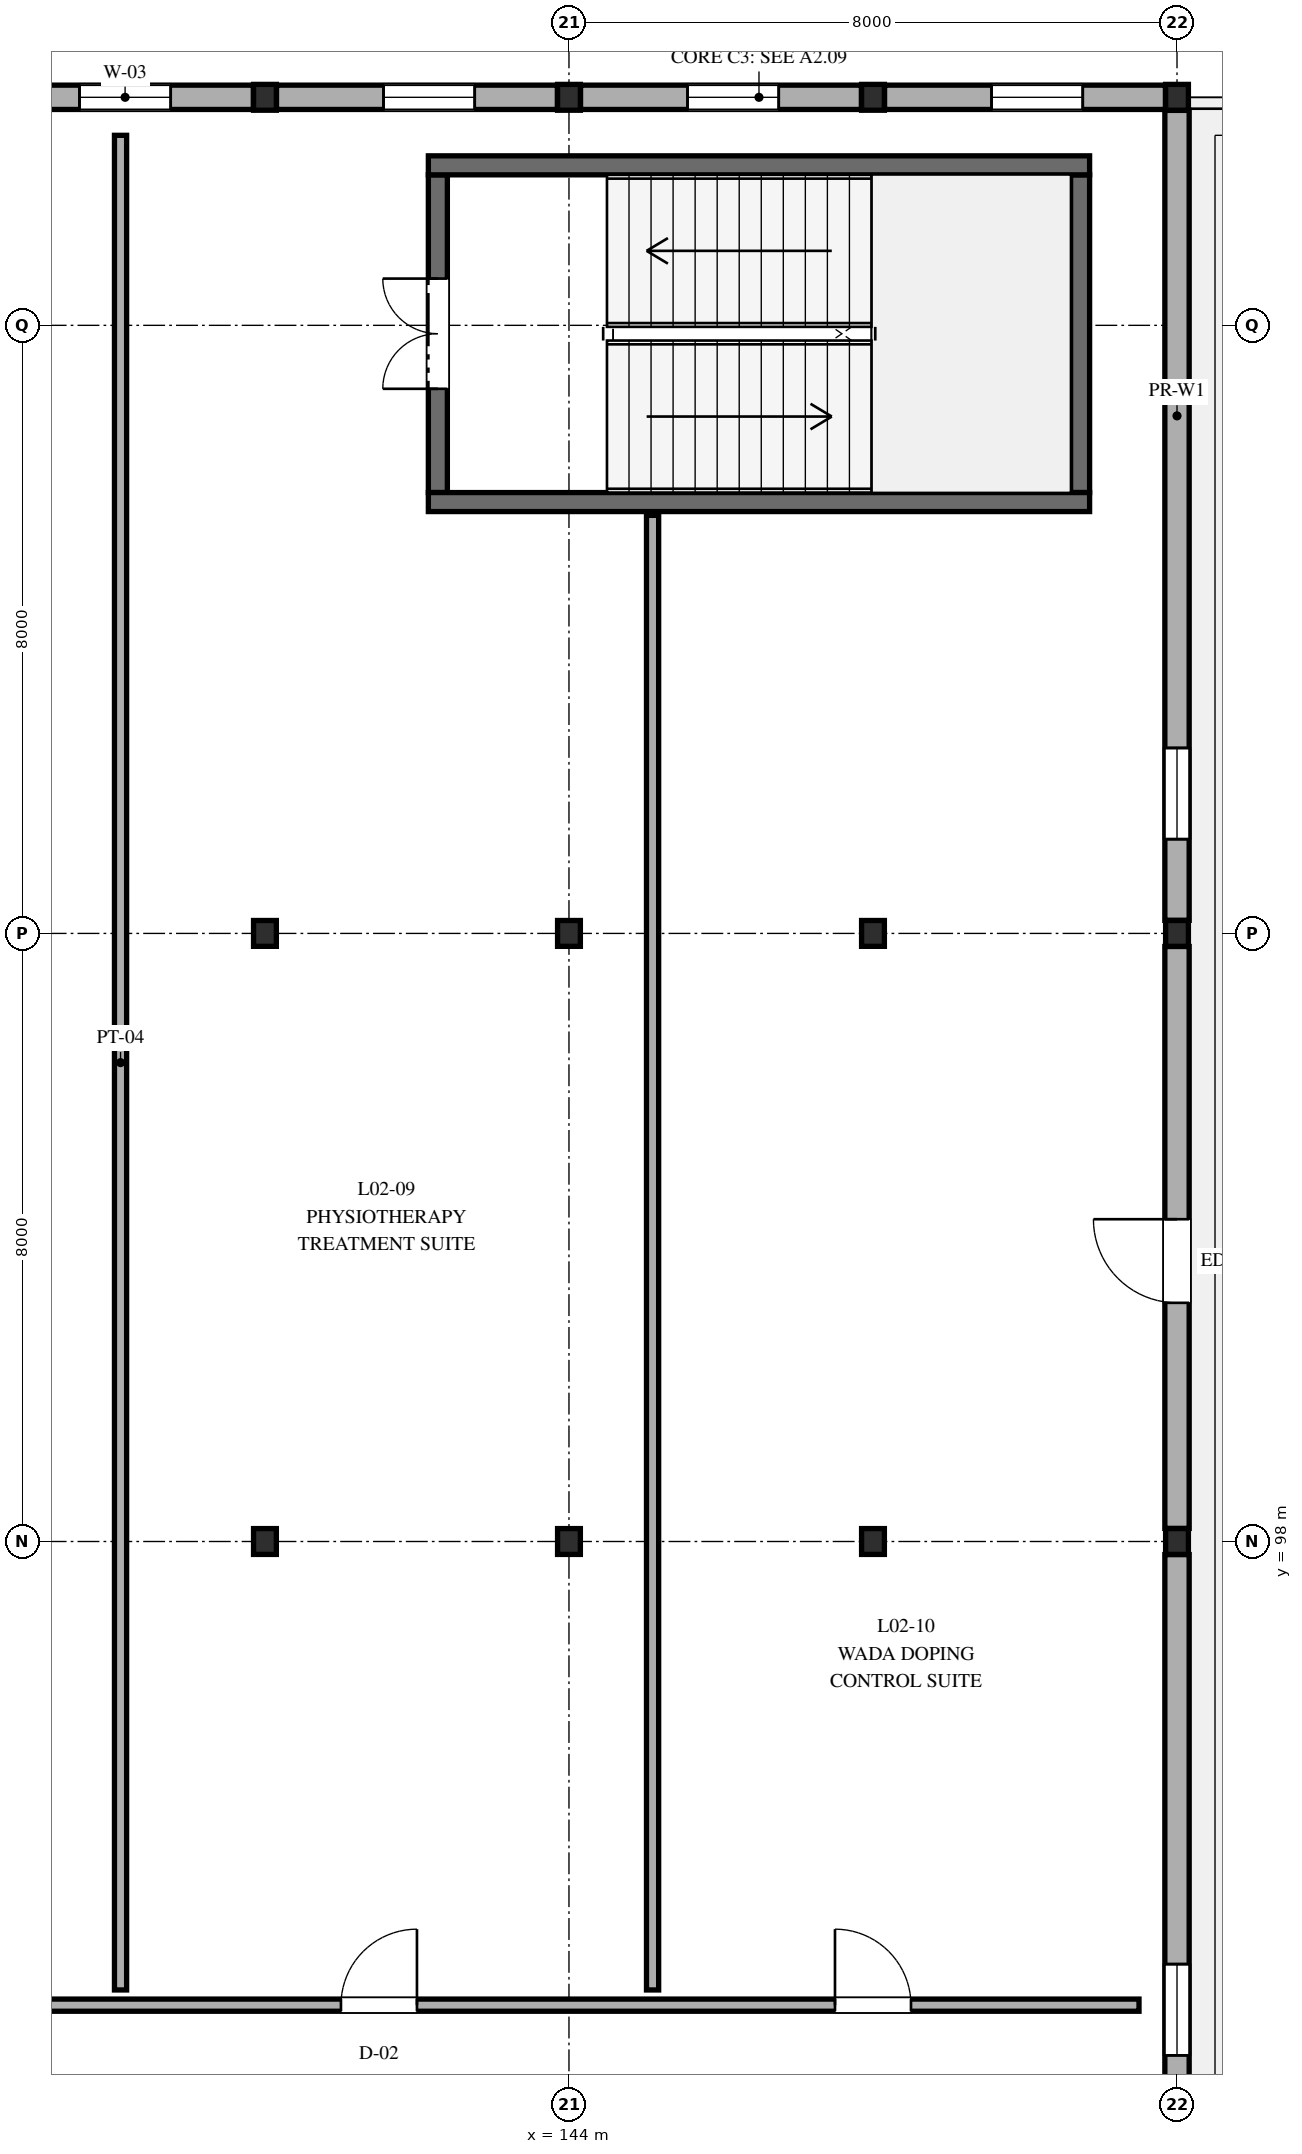
"""IFC4 building model, lengths in metres.
Left out: names, types, materials, properties, quantities, classifications, styles, units other than length and angle.
Written with IfcOpenShell. Run it as: python <this file> out.ifc"""

import sys

from ifc_helpers import new_model, si_unit, direction, frame, frame_2d, origin, origin_2d, place, context, subcontext, project, spatial, rectangle, i_section, extrude, element, fill, save


model = new_model("IFC4")
c1 = context("Model", 3, precision=1e-05, world=origin(), true_north=direction((0.0, 1.0)))
c2 = subcontext(c1, "Body", "Model", "MODEL_VIEW")
j1 = project(units=[si_unit("LENGTHUNIT", "METRE"), si_unit("PLANEANGLEUNIT", "RADIAN")], contexts=[c1])
p1 = place(None, origin())
s1 = spatial("IfcSite", under=j1, at=p1, CompositionType="ELEMENT")
p2 = place(p1, origin())
s2 = spatial("IfcBuilding", under=s1, at=p2, CompositionType="ELEMENT")
p3 = place(p2, frame((0.0, 0.0, 9.6)))
s3 = spatial("IfcBuildingStorey", under=s2, at=p3, CompositionType="ELEMENT", Elevation=9.6)
for number, where, z_axis, x_axis in (
    (1, (140.0, 98.0, 0.0), (0.0, 0.0, 1.0), (1.0, 0.0, 0.0)),
    (2, (140.0, 106.0, 0.0), (0.0, 0.0, 1.0), (1.0, 0.0, 0.0)),
    (3, (140.0, 117.0, 0.0), (0.0, 0.0, 1.0), (1.0, 0.0, 0.0)),
    (4, (144.0, 98.0, 0.0), (0.0, 0.0, 1.0), (1.0, 0.0, 0.0)),
    (5, (144.0, 106.0, 0.0), (0.0, 0.0, 1.0), (1.0, 0.0, 0.0)),
    (6, (144.0, 117.0, 0.0), (0.0, 0.0, 1.0), (1.0, 0.0, 0.0)),
    (7, (148.0, 98.0, 0.0), (0.0, 0.0, 1.0), (1.0, 0.0, 0.0)),
    (8, (148.0, 106.0, 0.0), (0.0, 0.0, 1.0), (1.0, 0.0, 0.0)),
    (9, (148.0, 117.0, 0.0), (0.0, 0.0, 1.0), (1.0, 0.0, 0.0)),
    (10, (152.0, 98.0, 0.0), (0.0, 0.0, 1.0), (1.0, 0.0, 0.0)),
    (11, (152.0, 106.0, 0.0), (0.0, 0.0, 1.0), (1.0, 0.0, 0.0)),
    (12, (152.0, 117.0, 0.0), (0.0, 0.0, 1.0), (1.0, 0.0, 0.0)),
):
    element("IfcColumn", number, at=place(p3, frame(where, z_axis=z_axis, x_axis=x_axis)), inside=s3, PredefinedType="COLUMN", context=c2, shape_type="SweptSolid", body=[
        extrude(i_section(OverallWidth=0.3, OverallDepth=0.34, WebThickness=0.012, FlangeThickness=0.021, FilletRadius=0.027, at=origin_2d()), origin(), (0.0, 0.0, 1.0), 4.4),
    ])
p4 = place(p3, frame((139.848, 117.0, 0.0), z_axis=(0.0, 0.0, 1.0), x_axis=(-1.0, 0.0, 0.0)))
e13 = element("IfcWall", 13, at=p4, inside=s3, PredefinedType="STANDARD", context=c2, shape_type="SweptSolid", body=[
    extrude(rectangle(XDim=3.696, YDim=0.32, at=frame_2d((1.848, 0.0))), origin(), (0.0, 0.0, 1.0), 3.775),
])
p5 = place(p4, frame((1.088, 0.0, 0.95)))
e14 = element("IfcOpeningElement", 14, at=p5, cuts=e13, PredefinedType="OPENING", context=c2, shape_type="SweptSolid", body=[
    extrude(rectangle(XDim=1.2, YDim=1.5, at=frame_2d((0.6, 0.75))), frame((0.0, 0.17, 0.0), z_axis=(0.0, -1.0, 0.0), x_axis=(1.0, 0.0, 0.0)), (0.0, 0.0, 1.0), 0.34),
])
p6 = place(p3, frame((143.848, 117.0, 0.0), z_axis=(0.0, 0.0, 1.0), x_axis=(-1.0, 0.0, 0.0)))
e15 = element("IfcWall", 15, at=p6, inside=s3, PredefinedType="STANDARD", context=c2, shape_type="SweptSolid", body=[
    extrude(rectangle(XDim=3.696, YDim=0.32, at=frame_2d((1.848, 0.0))), origin(), (0.0, 0.0, 1.0), 3.775),
])
p7 = place(p6, frame((1.088, 0.0, 0.95)))
e16 = element("IfcOpeningElement", 16, at=p7, cuts=e15, PredefinedType="OPENING", context=c2, shape_type="SweptSolid", body=[
    extrude(rectangle(XDim=1.2, YDim=1.5, at=frame_2d((0.6, 0.75))), frame((0.0, 0.17, 0.0), z_axis=(0.0, -1.0, 0.0), x_axis=(1.0, 0.0, 0.0)), (0.0, 0.0, 1.0), 0.34),
])
p8 = place(p3, frame((147.848, 117.0, 0.0), z_axis=(0.0, 0.0, 1.0), x_axis=(-1.0, 0.0, 0.0)))
e17 = element("IfcWall", 17, at=p8, inside=s3, PredefinedType="STANDARD", context=c2, shape_type="SweptSolid", body=[
    extrude(rectangle(XDim=3.696, YDim=0.32, at=frame_2d((1.848, 0.0))), origin(), (0.0, 0.0, 1.0), 3.775),
])
p9 = place(p8, frame((1.088, 0.0, 0.95)))
e18 = element("IfcOpeningElement", 18, at=p9, cuts=e17, PredefinedType="OPENING", context=c2, shape_type="SweptSolid", body=[
    extrude(rectangle(XDim=1.2, YDim=1.5, at=frame_2d((0.6, 0.75))), frame((0.0, 0.17, 0.0), z_axis=(0.0, -1.0, 0.0), x_axis=(1.0, 0.0, 0.0)), (0.0, 0.0, 1.0), 0.34),
])
p10 = place(p3, frame((151.848, 117.0, 0.0), z_axis=(0.0, 0.0, 1.0), x_axis=(-1.0, 0.0, 0.0)))
e19 = element("IfcWall", 19, at=p10, inside=s3, PredefinedType="STANDARD", context=c2, shape_type="SweptSolid", body=[
    extrude(rectangle(XDim=3.696, YDim=0.32, at=frame_2d((1.848, 0.0))), origin(), (0.0, 0.0, 1.0), 3.775),
])
p11 = place(p10, frame((1.088, 0.0, 0.95)))
e20 = element("IfcOpeningElement", 20, at=p11, cuts=e19, PredefinedType="OPENING", context=c2, shape_type="SweptSolid", body=[
    extrude(rectangle(XDim=1.2, YDim=1.5, at=frame_2d((0.6, 0.75))), frame((0.0, 0.17, 0.0), z_axis=(0.0, -1.0, 0.0), x_axis=(1.0, 0.0, 0.0)), (0.0, 0.0, 1.0), 0.34),
])
p12 = place(p3, frame((152.0, 90.172, 0.0), z_axis=(0.0, 0.0, 1.0), x_axis=(0.0, 1.0, 0.0)))
e21 = element("IfcWall", 21, at=p12, inside=s3, PredefinedType="STANDARD", context=c2, shape_type="SweptSolid", body=[
    extrude(rectangle(XDim=7.656, YDim=0.32, at=frame_2d((3.828, 0.0))), origin(), (0.0, 0.0, 1.0), 3.825),
])
p13 = place(p12, frame((1.068, 0.0, 0.95)))
e22 = element("IfcOpeningElement", 22, at=p13, cuts=e21, PredefinedType="OPENING", context=c2, shape_type="SweptSolid", body=[
    extrude(rectangle(XDim=1.2, YDim=1.5, at=frame_2d((0.6, 0.75))), frame((0.0, 0.17, 0.0), z_axis=(0.0, -1.0, 0.0), x_axis=(1.0, 0.0, 0.0)), (0.0, 0.0, 1.0), 0.34),
])
p14 = place(p3, frame((152.0, 98.172, 0.0), z_axis=(0.0, 0.0, 1.0), x_axis=(0.0, 1.0, 0.0)))
e23 = element("IfcWall", 23, at=p14, inside=s3, PredefinedType="STANDARD", context=c2, shape_type="SweptSolid", body=[
    extrude(rectangle(XDim=7.656, YDim=0.32, at=frame_2d((3.828, 0.0))), origin(), (0.0, 0.0, 1.0), 3.825),
])
p15 = place(p14, frame((2.968, 0.0, 0.0)))
e24 = element("IfcOpeningElement", 24, at=p15, cuts=e23, PredefinedType="OPENING", context=c2, shape_type="SweptSolid", body=[
    extrude(rectangle(XDim=1.1, YDim=2.2, at=frame_2d((0.55, 1.1))), frame((0.0, 0.17, 0.0), z_axis=(0.0, -1.0, 0.0), x_axis=(1.0, 0.0, 0.0)), (0.0, 0.0, 1.0), 0.34),
])
p16 = place(p3, frame((152.0, 106.172, 0.0), z_axis=(0.0, 0.0, 1.0), x_axis=(0.0, 1.0, 0.0)))
e25 = element("IfcWall", 25, at=p16, inside=s3, PredefinedType="STANDARD", context=c2, shape_type="SweptSolid", body=[
    extrude(rectangle(XDim=10.656, YDim=0.32, at=frame_2d((5.328, 0.0))), origin(), (0.0, 0.0, 1.0), 3.825),
])
p17 = place(p16, frame((1.068, 0.0, 0.95)))
e26 = element("IfcOpeningElement", 26, at=p17, cuts=e25, PredefinedType="OPENING", context=c2, shape_type="SweptSolid", body=[
    extrude(rectangle(XDim=1.2, YDim=1.5, at=frame_2d((0.6, 0.75))), frame((0.0, 0.17, 0.0), z_axis=(0.0, -1.0, 0.0), x_axis=(1.0, 0.0, 0.0)), (0.0, 0.0, 1.0), 0.34),
])
p18 = place(p3, frame((142.275, 111.8, 0.0), z_axis=(0.0, 0.0, 1.0), x_axis=(0.0, 1.0, 0.0)))
e27 = element("IfcWall", 27, at=p18, inside=s3, PredefinedType="SHEAR", context=c2, shape_type="SweptSolid", body=[
    extrude(rectangle(XDim=4.18, YDim=0.25, at=frame_2d((2.09, 0.0))), origin(), (0.0, 0.0, 1.0), 4.4),
])
p19 = place(p18, frame((1.365, 0.0, 0.0)))
e28 = element("IfcOpeningElement", 28, at=p19, cuts=e27, PredefinedType="OPENING", context=c2, shape_type="SweptSolid", body=[
    extrude(rectangle(XDim=1.45, YDim=2.2, at=frame_2d((0.725, 1.1))), frame((0.0, 0.135, 0.0), z_axis=(0.0, -1.0, 0.0), x_axis=(1.0, 0.0, 0.0)), (0.0, 0.0, 1.0), 0.27),
])
p20 = place(p3, frame((150.725, 115.98, 0.0), z_axis=(0.0, 0.0, 1.0), x_axis=(0.0, -1.0, 0.0)))
e29 = element("IfcWall", 29, at=p20, inside=s3, PredefinedType="SHEAR", context=c2, shape_type="SweptSolid", body=[
    extrude(rectangle(XDim=4.18, YDim=0.25, at=frame_2d((2.09, 0.0))), origin(), (0.0, 0.0, 1.0), 4.4),
])
for number, where, z_axis, x_axis in (
    (30, (142.15, 111.675, 0.0), (0.0, 0.0, 1.0), (1.0, 0.0, 0.0)),
    (31, (150.85, 116.105, 0.0), (0.0, 0.0, 1.0), (-1.0, 0.0, 0.0)),
):
    element("IfcWall", number, at=place(p3, frame(where, z_axis=z_axis, x_axis=x_axis)), inside=s3, PredefinedType="SHEAR", context=c2, shape_type="SweptSolid", body=[
        extrude(rectangle(XDim=8.7, YDim=0.25, at=frame_2d((4.35, 0.0))), origin(), (0.0, 0.0, 1.0), 4.4),
    ])
p21 = place(p3, frame((104.5, 91.9, 0.0), z_axis=(0.0, 0.0, 1.0), x_axis=(1.0, 0.0, 0.0)))
e32 = element("IfcWall", 32, at=p21, inside=s3, PredefinedType="PARTITIONING", context=c2, shape_type="SweptSolid", body=[
    extrude(rectangle(XDim=47.0, YDim=0.16, at=frame_2d((23.5, 0.0))), origin(), (0.0, 0.0, 1.0), 3.7),
])
p22 = place(p21, frame((2.5, 0.0, 0.0)))
e33 = element("IfcOpeningElement", 33, at=p22, cuts=e32, PredefinedType="OPENING", context=c2, shape_type="SweptSolid", body=[
    extrude(rectangle(XDim=1.1, YDim=2.2, at=frame_2d((0.55, 1.1))), frame((0.0, 0.09, 0.0), z_axis=(0.0, -1.0, 0.0), x_axis=(1.0, 0.0, 0.0)), (0.0, 0.0, 1.0), 0.18),
])
p23 = place(p21, frame((9.5, 0.0, 0.0)))
e34 = element("IfcOpeningElement", 34, at=p23, cuts=e32, PredefinedType="OPENING", context=c2, shape_type="SweptSolid", body=[
    extrude(rectangle(XDim=1.05, YDim=2.15, at=frame_2d((0.525, 1.075))), frame((0.0, 0.09, 0.0), z_axis=(0.0, -1.0, 0.0), x_axis=(1.0, 0.0, 0.0)), (0.0, 0.0, 1.0), 0.18),
])
p24 = place(p21, frame((12.8, 0.0, 0.0)))
e35 = element("IfcOpeningElement", 35, at=p24, cuts=e32, PredefinedType="OPENING", context=c2, shape_type="SweptSolid", body=[
    extrude(rectangle(XDim=1.6, YDim=2.2, at=frame_2d((0.8, 1.1))), frame((0.0, 0.09, 0.0), z_axis=(0.0, -1.0, 0.0), x_axis=(1.0, 0.0, 0.0)), (0.0, 0.0, 1.0), 0.18),
])
p25 = place(p21, frame((24.0, 0.0, 0.0)))
e36 = element("IfcOpeningElement", 36, at=p25, cuts=e32, PredefinedType="OPENING", context=c2, shape_type="SweptSolid", body=[
    extrude(rectangle(XDim=1.0, YDim=2.15, at=frame_2d((0.5, 1.075))), frame((0.0, 0.09, 0.0), z_axis=(0.0, -1.0, 0.0), x_axis=(1.0, 0.0, 0.0)), (0.0, 0.0, 1.0), 0.18),
])
p26 = place(p21, frame((36.5, 0.0, 0.0)))
e37 = element("IfcOpeningElement", 37, at=p26, cuts=e32, PredefinedType="OPENING", context=c2, shape_type="SweptSolid", body=[
    extrude(rectangle(XDim=1.0, YDim=2.15, at=frame_2d((0.5, 1.075))), frame((0.0, 0.09, 0.0), z_axis=(0.0, -1.0, 0.0), x_axis=(1.0, 0.0, 0.0)), (0.0, 0.0, 1.0), 0.18),
])
p27 = place(p21, frame((43.0, 0.0, 0.0)))
e38 = element("IfcOpeningElement", 38, at=p27, cuts=e32, PredefinedType="OPENING", context=c2, shape_type="SweptSolid", body=[
    extrude(rectangle(XDim=1.0, YDim=2.15, at=frame_2d((0.5, 1.075))), frame((0.0, 0.09, 0.0), z_axis=(0.0, -1.0, 0.0), x_axis=(1.0, 0.0, 0.0)), (0.0, 0.0, 1.0), 0.18),
])
p28 = place(p21, frame((28.5, 0.0, 1.1)))
e39 = element("IfcOpeningElement", 39, at=p28, cuts=e32, PredefinedType="OPENING", context=c2, shape_type="SweptSolid", body=[
    extrude(rectangle(XDim=1.6, YDim=1.35, at=frame_2d((0.8, 0.675))), frame((0.0, 0.09, 0.0), z_axis=(0.0, -1.0, 0.0), x_axis=(1.0, 0.0, 0.0)), (0.0, 0.0, 1.0), 0.18),
])
p29 = place(p3, frame((138.1, 92.1, 0.0), z_axis=(0.0, 0.0, 1.0), x_axis=(0.0, 1.0, 0.0)))
e40 = element("IfcWall", 40, at=p29, inside=s3, PredefinedType="PARTITIONING", context=c2, shape_type="SweptSolid", body=[
    extrude(rectangle(XDim=24.4, YDim=0.16, at=frame_2d((12.2, 0.0))), origin(), (0.0, 0.0, 1.0), 3.7),
])
p30 = place(p3, frame((145.1, 92.1, 0.0), z_axis=(0.0, 0.0, 1.0), x_axis=(0.0, 1.0, 0.0)))
e41 = element("IfcWall", 41, at=p30, inside=s3, PredefinedType="PARTITIONING", context=c2, shape_type="SweptSolid", body=[
    extrude(rectangle(XDim=19.4, YDim=0.16, at=frame_2d((9.7, 0.0))), origin(), (0.0, 0.0, 1.0), 3.7),
])
p31 = place(p5, origin())
e42 = element("IfcWindow", 42, at=p31, inside=s3, PartitioningType="SINGLE_PANEL", PredefinedType="WINDOW", context=c2, shape_type="SweptSolid", body=[
    extrude(rectangle(XDim=1.2, YDim=1.5, at=frame_2d((0.6, 0.75))), frame((0.0, 0.03, 0.0), z_axis=(0.0, -1.0, 0.0), x_axis=(1.0, 0.0, 0.0)), (0.0, 0.0, 1.0), 0.06),
])
fill(e14, e42)
p32 = place(p7, origin())
e43 = element("IfcWindow", 43, at=p32, inside=s3, PartitioningType="SINGLE_PANEL", PredefinedType="WINDOW", context=c2, shape_type="SweptSolid", body=[
    extrude(rectangle(XDim=1.2, YDim=1.5, at=frame_2d((0.6, 0.75))), frame((0.0, 0.03, 0.0), z_axis=(0.0, -1.0, 0.0), x_axis=(1.0, 0.0, 0.0)), (0.0, 0.0, 1.0), 0.06),
])
fill(e16, e43)
p33 = place(p9, origin())
e44 = element("IfcWindow", 44, at=p33, inside=s3, PartitioningType="SINGLE_PANEL", PredefinedType="WINDOW", context=c2, shape_type="SweptSolid", body=[
    extrude(rectangle(XDim=1.2, YDim=1.5, at=frame_2d((0.6, 0.75))), frame((0.0, 0.03, 0.0), z_axis=(0.0, -1.0, 0.0), x_axis=(1.0, 0.0, 0.0)), (0.0, 0.0, 1.0), 0.06),
])
fill(e18, e44)
p34 = place(p11, origin())
e45 = element("IfcWindow", 45, at=p34, inside=s3, PartitioningType="SINGLE_PANEL", PredefinedType="WINDOW", context=c2, shape_type="SweptSolid", body=[
    extrude(rectangle(XDim=1.2, YDim=1.5, at=frame_2d((0.6, 0.75))), frame((0.0, 0.03, 0.0), z_axis=(0.0, -1.0, 0.0), x_axis=(1.0, 0.0, 0.0)), (0.0, 0.0, 1.0), 0.06),
])
fill(e20, e45)
p35 = place(p13, origin())
e46 = element("IfcWindow", 46, at=p35, inside=s3, PartitioningType="SINGLE_PANEL", PredefinedType="WINDOW", context=c2, shape_type="SweptSolid", body=[
    extrude(rectangle(XDim=1.2, YDim=1.5, at=frame_2d((0.6, 0.75))), frame((0.0, 0.03, 0.0), z_axis=(0.0, -1.0, 0.0), x_axis=(1.0, 0.0, 0.0)), (0.0, 0.0, 1.0), 0.06),
])
fill(e22, e46)
p36 = place(p15, origin())
e47 = element("IfcDoor", 47, at=p36, inside=s3, OperationType="SINGLE_SWING_RIGHT", PredefinedType="DOOR", context=c2, shape_type="SweptSolid", body=[
    extrude(rectangle(XDim=1.1, YDim=2.2, at=frame_2d((0.55, 1.1))), frame((0.0, 0.025, 0.0), z_axis=(0.0, -1.0, 0.0), x_axis=(1.0, 0.0, 0.0)), (0.0, 0.0, 1.0), 0.05),
])
fill(e24, e47)
p37 = place(p17, origin())
e48 = element("IfcWindow", 48, at=p37, inside=s3, PartitioningType="SINGLE_PANEL", PredefinedType="WINDOW", context=c2, shape_type="SweptSolid", body=[
    extrude(rectangle(XDim=1.2, YDim=1.5, at=frame_2d((0.6, 0.75))), frame((0.0, 0.03, 0.0), z_axis=(0.0, -1.0, 0.0), x_axis=(1.0, 0.0, 0.0)), (0.0, 0.0, 1.0), 0.06),
])
fill(e26, e48)
p38 = place(p19, origin())
e49 = element("IfcDoor", 49, at=p38, inside=s3, OperationType="DOUBLE_DOOR_SINGLE_SWING", PredefinedType="DOOR", context=c2, shape_type="SweptSolid", body=[
    extrude(rectangle(XDim=1.45, YDim=2.2, at=frame_2d((0.725, 1.1))), frame((0.0, 0.025, 0.0), z_axis=(0.0, -1.0, 0.0), x_axis=(1.0, 0.0, 0.0)), (0.0, 0.0, 1.0), 0.05),
])
fill(e28, e49)
p39 = place(p26, origin())
e50 = element("IfcDoor", 50, at=p39, inside=s3, OperationType="SINGLE_SWING_RIGHT", PredefinedType="DOOR", context=c2, shape_type="SweptSolid", body=[
    extrude(rectangle(XDim=1.0, YDim=2.15, at=frame_2d((0.5, 1.075))), frame((0.0, 0.025, 0.0), z_axis=(0.0, -1.0, 0.0), x_axis=(1.0, 0.0, 0.0)), (0.0, 0.0, 1.0), 0.05),
])
fill(e37, e50)
p40 = place(p27, origin())
e51 = element("IfcDoor", 51, at=p40, inside=s3, OperationType="SINGLE_SWING_LEFT", PredefinedType="DOOR", context=c2, shape_type="SweptSolid", body=[
    extrude(rectangle(XDim=1.0, YDim=2.15, at=frame_2d((0.5, 1.075))), frame((0.0, 0.025, 0.0), z_axis=(0.0, -1.0, 0.0), x_axis=(1.0, 0.0, 0.0)), (0.0, 0.0, 1.0), 0.05),
])
fill(e38, e51)
save(model, sys.argv[1])
